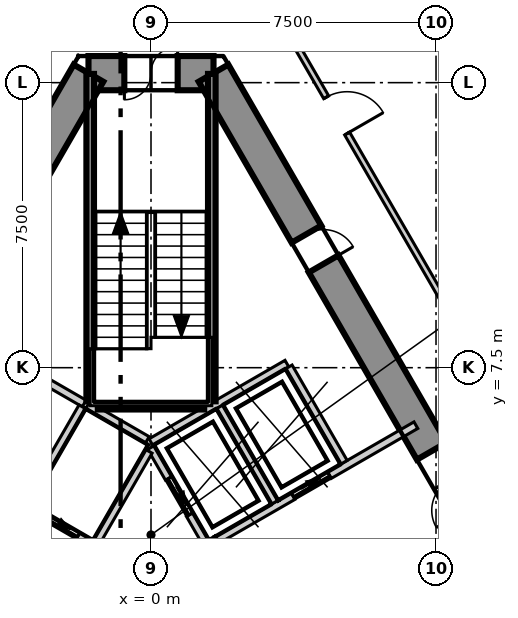
"""IFC4 building model, lengths in metres.
Left out: names, types, materials, properties, quantities, classifications, styles, units other than length and angle.
Written with IfcOpenShell. Run it as: python <this file> out.ifc"""

import sys

from ifc_helpers import new_model, si_unit, direction, frame, frame_2d, origin, place, context, subcontext, project, spatial, polyline, rectangle, outline, extrude, element, fill, save


model = new_model("IFC4")
c1 = context("Model", 3, precision=1e-05, world=origin(), true_north=direction((0.0, 1.0)))
c2 = subcontext(c1, "Body", "Model", "MODEL_VIEW")
j1 = project(units=[si_unit("LENGTHUNIT", "METRE"), si_unit("PLANEANGLEUNIT", "RADIAN")], contexts=[c1])
p1 = place(None, origin())
s1 = spatial("IfcSite", under=j1, at=p1, CompositionType="ELEMENT")
p2 = place(p1, origin())
s2 = spatial("IfcBuilding", under=s1, at=p2, CompositionType="ELEMENT")
p3 = place(p2, frame((0.0, 0.0, 47.3)))
s3 = spatial("IfcBuildingStorey", under=s2, at=p3, CompositionType="ELEMENT", Elevation=47.3)
p4 = place(p3, frame((1.645, 15.25, -0.3), z_axis=(0.0, 0.0, 1.0), x_axis=(-1.0, 0.0, 0.0)))
e1 = element("IfcWall", 1, at=p4, inside=s3, PredefinedType="SHEAR", context=c2, shape_type="SweptSolid", body=[
    extrude(outline(polyline([(-0.26, -0.45), (1.645, -0.45), (3.55, -0.45), (3.031, 0.45), (1.645, 0.45), (0.259, 0.45), (-0.26, -0.45)])), origin(), (0.0, 0.0, 1.0), 4.0),
])
p5 = place(p4, frame((0.945, 0.0, 0.3)))
e2 = element("IfcOpeningElement", 2, at=p5, cuts=e1, PredefinedType="OPENING", context=c2, shape_type="SweptSolid", body=[
    extrude(rectangle(XDim=1.4, YDim=2.1, at=frame_2d((0.7, 1.05))), frame((0.0, 0.46, 0.0), z_axis=(0.0, -1.0, 0.0), x_axis=(1.0, 0.0, 0.0)), (0.0, 0.0, 1.0), 0.92),
])
p6 = place(p3, frame((-1.645, 15.25, -0.3), z_axis=(0.0, 0.0, 1.0), x_axis=(-0.500026485275, -0.866010111964, 0.0)))
e3 = element("IfcWall", 3, at=p6, inside=s3, PredefinedType="SHEAR", context=c2, shape_type="SweptSolid", body=[
    extrude(outline(polyline([(-0.26, -0.45), (1.685, -0.45), (3.63, -0.45), (5.576, -0.45), (7.521, -0.45), (9.466, -0.449), (11.411, -0.449), (13.357, -0.449), (15.302, -0.449), (17.247, -0.449), (19.192, -0.449), (21.138, -0.449), (23.083, -0.449), (25.028, -0.449), (24.509, 0.45), (22.644, 0.45), (20.778, 0.45), (18.913, 0.45), (17.048, 0.45), (15.182, 0.449), (13.317, 0.449), (11.452, 0.449), (9.587, 0.449), (7.721, 0.449), (5.856, 0.449), (3.991, 0.449), (2.125, 0.449), (0.26, 0.449), (-0.26, -0.45)])), origin(), (0.0, 0.0, 1.0), 4.0),
])
p7 = place(p6, frame((11.834, 0.0, 0.3)))
e4 = element("IfcOpeningElement", 4, at=p7, cuts=e3, PredefinedType="OPENING", context=c2, shape_type="SweptSolid", body=[
    extrude(rectangle(XDim=1.1, YDim=2.1, at=frame_2d((0.55, 1.05))), frame((0.0, 0.46, 0.0), z_axis=(0.0, -1.0, 0.0), x_axis=(1.0, 0.0, 0.0)), (0.0, 0.0, 1.0), 0.92),
])
p8 = place(p6, frame((6.671, 0.0, 0.3)))
e5 = element("IfcOpeningElement", 5, at=p8, cuts=e3, PredefinedType="OPENING", context=c2, shape_type="SweptSolid", body=[
    extrude(rectangle(XDim=1.0, YDim=2.1, at=frame_2d((0.5, 1.05))), frame((0.0, 0.46, 0.0), z_axis=(0.0, -1.0, 0.0), x_axis=(1.0, 0.0, 0.0)), (0.0, 0.0, 1.0), 0.92),
])
p9 = place(p3, frame((14.03, -6.2, -0.3), z_axis=(0.0, 0.0, 1.0), x_axis=(-0.500026485275, 0.866010111964, 0.0)))
e6 = element("IfcWall", 6, at=p9, inside=s3, PredefinedType="SHEAR", context=c2, shape_type="SweptSolid", body=[
    extrude(outline(polyline([(-0.26, -0.449), (1.685, -0.449), (3.63, -0.449), (5.576, -0.449), (7.521, -0.449), (9.466, -0.449), (11.411, -0.449), (13.357, -0.449), (15.302, -0.449), (17.247, -0.45), (19.192, -0.45), (21.138, -0.45), (23.083, -0.45), (25.028, -0.45), (24.509, 0.449), (22.644, 0.449), (20.778, 0.449), (18.913, 0.449), (17.048, 0.449), (15.182, 0.449), (13.317, 0.449), (11.452, 0.449), (9.587, 0.449), (7.721, 0.45), (5.856, 0.45), (3.991, 0.45), (2.125, 0.45), (0.26, 0.45), (-0.26, -0.449)])), origin(), (0.0, 0.0, 1.0), 4.0),
])
p10 = place(p9, frame((11.484, 0.0, 0.3)))
e7 = element("IfcOpeningElement", 7, at=p10, cuts=e6, PredefinedType="OPENING", context=c2, shape_type="SweptSolid", body=[
    extrude(rectangle(XDim=1.8, YDim=2.1, at=frame_2d((0.9, 1.05))), frame((0.0, 0.46, 0.0), z_axis=(0.0, -1.0, 0.0), x_axis=(1.0, 0.0, 0.0)), (0.0, 0.0, 1.0), 0.92),
])
p11 = place(p9, frame((18.976, 0.0, 0.3)))
e8 = element("IfcOpeningElement", 8, at=p11, cuts=e6, PredefinedType="OPENING", context=c2, shape_type="SweptSolid", body=[
    extrude(rectangle(XDim=0.9, YDim=2.1, at=frame_2d((0.45, 1.05))), frame((0.0, 0.46, 0.0), z_axis=(0.0, -1.0, 0.0), x_axis=(1.0, 0.0, 0.0)), (0.0, 0.0, 1.0), 0.92),
])
p12 = place(p3, frame((34.701, -16.089, 0.0), z_axis=(0.0, 0.0, 1.0), x_axis=(-0.499998722828, 0.866026141159, 0.0)))
e9 = element("IfcWall", 9, at=p12, inside=s3, PredefinedType="ELEMENTEDWALL", context=c2, shape_type="SweptSolid", body=[
    extrude(rectangle(XDim=62.548, YDim=0.2, at=frame_2d((31.274, 0.0))), origin(), (0.0, 0.0, 1.0), 3.7),
])
p13 = place(p12, frame((2.25, 0.0, 0.9)))
e10 = element("IfcOpeningElement", 10, at=p13, cuts=e9, PredefinedType="OPENING", context=c2, shape_type="SweptSolid", body=[
    extrude(rectangle(XDim=5.6, YDim=2.5, at=frame_2d((2.8, 1.25))), frame((0.0, 0.11, 0.0), z_axis=(0.0, -1.0, 0.0), x_axis=(1.0, 0.0, 0.0)), (0.0, 0.0, 1.0), 0.22),
])
p14 = place(p12, frame((9.746, 0.0, 0.9)))
e11 = element("IfcOpeningElement", 11, at=p14, cuts=e9, PredefinedType="OPENING", context=c2, shape_type="SweptSolid", body=[
    extrude(rectangle(XDim=5.6, YDim=2.5, at=frame_2d((2.8, 1.25))), frame((0.0, 0.11, 0.0), z_axis=(0.0, -1.0, 0.0), x_axis=(1.0, 0.0, 0.0)), (0.0, 0.0, 1.0), 0.22),
])
p15 = place(p12, frame((17.241, 0.0, 0.9)))
e12 = element("IfcOpeningElement", 12, at=p15, cuts=e9, PredefinedType="OPENING", context=c2, shape_type="SweptSolid", body=[
    extrude(rectangle(XDim=5.6, YDim=2.5, at=frame_2d((2.8, 1.25))), frame((0.0, 0.11, 0.0), z_axis=(0.0, -1.0, 0.0), x_axis=(1.0, 0.0, 0.0)), (0.0, 0.0, 1.0), 0.22),
])
p16 = place(p12, frame((24.736, 0.0, 0.9)))
e13 = element("IfcOpeningElement", 13, at=p16, cuts=e9, PredefinedType="OPENING", context=c2, shape_type="SweptSolid", body=[
    extrude(rectangle(XDim=5.6, YDim=2.5, at=frame_2d((2.8, 1.25))), frame((0.0, 0.11, 0.0), z_axis=(0.0, -1.0, 0.0), x_axis=(1.0, 0.0, 0.0)), (0.0, 0.0, 1.0), 0.22),
])
p17 = place(p12, frame((32.232, 0.0, 0.9)))
e14 = element("IfcOpeningElement", 14, at=p17, cuts=e9, PredefinedType="OPENING", context=c2, shape_type="SweptSolid", body=[
    extrude(rectangle(XDim=5.6, YDim=2.5, at=frame_2d((2.8, 1.25))), frame((0.0, 0.11, 0.0), z_axis=(0.0, -1.0, 0.0), x_axis=(1.0, 0.0, 0.0)), (0.0, 0.0, 1.0), 0.22),
])
p18 = place(p12, frame((39.727, 0.0, 0.9)))
e15 = element("IfcOpeningElement", 15, at=p18, cuts=e9, PredefinedType="OPENING", context=c2, shape_type="SweptSolid", body=[
    extrude(rectangle(XDim=5.6, YDim=2.5, at=frame_2d((2.8, 1.25))), frame((0.0, 0.11, 0.0), z_axis=(0.0, -1.0, 0.0), x_axis=(1.0, 0.0, 0.0)), (0.0, 0.0, 1.0), 0.22),
])
p19 = place(p12, frame((47.222, 0.0, 0.9)))
e16 = element("IfcOpeningElement", 16, at=p19, cuts=e9, PredefinedType="OPENING", context=c2, shape_type="SweptSolid", body=[
    extrude(rectangle(XDim=5.6, YDim=2.5, at=frame_2d((2.8, 1.25))), frame((0.0, 0.11, 0.0), z_axis=(0.0, -1.0, 0.0), x_axis=(1.0, 0.0, 0.0)), (0.0, 0.0, 1.0), 0.22),
])
p20 = place(p12, frame((54.717, 0.0, 0.9)))
e17 = element("IfcOpeningElement", 17, at=p20, cuts=e9, PredefinedType="OPENING", context=c2, shape_type="SweptSolid", body=[
    extrude(rectangle(XDim=5.6, YDim=2.5, at=frame_2d((2.8, 1.25))), frame((0.0, 0.11, 0.0), z_axis=(0.0, -1.0, 0.0), x_axis=(1.0, 0.0, 0.0)), (0.0, 0.0, 1.0), 0.22),
])
p21 = place(p3, frame((-19.497, -11.17, 0.0), z_axis=(0.0, 0.0, 1.0), x_axis=(0.499998854553, 0.866026065108, 0.0)))
e18 = element("IfcWall", 18, at=p21, inside=s3, PredefinedType="PARTITIONING", context=c2, shape_type="SweptSolid", body=[
    extrude(rectangle(XDim=38.994, YDim=0.15, at=frame_2d((19.497, 0.0))), origin(), (0.0, 0.0, 1.0), 3.7),
])
p22 = place(p21, frame((36.144, 0.0, 0.0)))
e19 = element("IfcOpeningElement", 19, at=p22, cuts=e18, PredefinedType="OPENING", context=c2, shape_type="SweptSolid", body=[
    extrude(rectangle(XDim=1.1, YDim=2.1, at=frame_2d((0.55, 1.05))), frame((0.0, 0.085, 0.0), z_axis=(0.0, -1.0, 0.0), x_axis=(1.0, 0.0, 0.0)), (0.0, 0.0, 1.0), 0.17),
])
p23 = place(p21, frame((21.963, 0.0, 0.0)))
e20 = element("IfcOpeningElement", 20, at=p23, cuts=e18, PredefinedType="OPENING", context=c2, shape_type="SweptSolid", body=[
    extrude(rectangle(XDim=1.1, YDim=2.1, at=frame_2d((0.55, 1.05))), frame((0.0, 0.085, 0.0), z_axis=(0.0, -1.0, 0.0), x_axis=(1.0, 0.0, 0.0)), (0.0, 0.0, 1.0), 0.17),
])
p24 = place(p21, frame((32.363, 0.0, 0.0)))
e21 = element("IfcOpeningElement", 21, at=p24, cuts=e18, PredefinedType="OPENING", context=c2, shape_type="SweptSolid", body=[
    extrude(rectangle(XDim=0.9, YDim=2.1, at=frame_2d((0.45, 1.05))), frame((0.0, 0.085, 0.0), z_axis=(0.0, -1.0, 0.0), x_axis=(1.0, 0.0, 0.0)), (0.0, 0.0, 1.0), 0.17),
])
p25 = place(p21, frame((29.163, 0.0, 0.0)))
e22 = element("IfcOpeningElement", 22, at=p25, cuts=e18, PredefinedType="OPENING", context=c2, shape_type="SweptSolid", body=[
    extrude(rectangle(XDim=0.9, YDim=2.1, at=frame_2d((0.45, 1.05))), frame((0.0, 0.085, 0.0), z_axis=(0.0, -1.0, 0.0), x_axis=(1.0, 0.0, 0.0)), (0.0, 0.0, 1.0), 0.17),
])
p26 = place(p21, frame((26.263, 0.0, 0.0)))
e23 = element("IfcOpeningElement", 23, at=p26, cuts=e18, PredefinedType="OPENING", context=c2, shape_type="SweptSolid", body=[
    extrude(rectangle(XDim=1.0, YDim=2.1, at=frame_2d((0.5, 1.05))), frame((0.0, 0.085, 0.0), z_axis=(0.0, -1.0, 0.0), x_axis=(1.0, 0.0, 0.0)), (0.0, 0.0, 1.0), 0.17),
])
p27 = place(p21, frame((11.373, 0.0, 0.0)))
e24 = element("IfcOpeningElement", 24, at=p27, cuts=e18, PredefinedType="OPENING", context=c2, shape_type="SweptSolid", body=[
    extrude(rectangle(XDim=1.1, YDim=2.1, at=frame_2d((0.55, 1.05))), frame((0.0, 0.085, 0.0), z_axis=(0.0, -1.0, 0.0), x_axis=(1.0, 0.0, 0.0)), (0.0, 0.0, 1.0), 0.17),
])
p28 = place(p21, frame((1.581, 0.0, 0.0)))
e25 = element("IfcOpeningElement", 25, at=p28, cuts=e18, PredefinedType="OPENING", context=c2, shape_type="SweptSolid", body=[
    extrude(rectangle(XDim=1.1, YDim=2.1, at=frame_2d((0.55, 1.05))), frame((0.0, 0.085, 0.0), z_axis=(0.0, -1.0, 0.0), x_axis=(1.0, 0.0, 0.0)), (0.0, 0.0, 1.0), 0.17),
])
p29 = place(p3, frame((0.075, 22.47, 0.0), z_axis=(0.0, 0.0, 1.0), x_axis=(0.500002280369, -0.866024087209, 0.0)))
e26 = element("IfcWall", 26, at=p29, inside=s3, PredefinedType="PARTITIONING", context=c2, shape_type="SweptSolid", body=[
    extrude(rectangle(XDim=38.844, YDim=0.15, at=frame_2d((19.422, 0.0))), origin(), (0.0, 0.0, 1.0), 3.7),
])
p30 = place(p29, frame((36.244, 0.0, 0.0)))
e27 = element("IfcOpeningElement", 27, at=p30, cuts=e26, PredefinedType="OPENING", context=c2, shape_type="SweptSolid", body=[
    extrude(rectangle(XDim=1.0, YDim=2.1, at=frame_2d((0.5, 1.05))), frame((0.0, 0.085, 0.0), z_axis=(0.0, -1.0, 0.0), x_axis=(1.0, 0.0, 0.0)), (0.0, 0.0, 1.0), 0.17),
])
p31 = place(p29, frame((21.963, 0.0, 0.0)))
e28 = element("IfcOpeningElement", 28, at=p31, cuts=e26, PredefinedType="OPENING", context=c2, shape_type="SweptSolid", body=[
    extrude(rectangle(XDim=1.1, YDim=2.1, at=frame_2d((0.55, 1.05))), frame((0.0, 0.085, 0.0), z_axis=(0.0, -1.0, 0.0), x_axis=(1.0, 0.0, 0.0)), (0.0, 0.0, 1.0), 0.17),
])
p32 = place(p29, frame((32.363, 0.0, 0.0)))
e29 = element("IfcOpeningElement", 29, at=p32, cuts=e26, PredefinedType="OPENING", context=c2, shape_type="SweptSolid", body=[
    extrude(rectangle(XDim=0.9, YDim=2.1, at=frame_2d((0.45, 1.05))), frame((0.0, 0.085, 0.0), z_axis=(0.0, -1.0, 0.0), x_axis=(1.0, 0.0, 0.0)), (0.0, 0.0, 1.0), 0.17),
])
p33 = place(p29, frame((29.163, 0.0, 0.0)))
e30 = element("IfcOpeningElement", 30, at=p33, cuts=e26, PredefinedType="OPENING", context=c2, shape_type="SweptSolid", body=[
    extrude(rectangle(XDim=0.9, YDim=2.1, at=frame_2d((0.45, 1.05))), frame((0.0, 0.085, 0.0), z_axis=(0.0, -1.0, 0.0), x_axis=(1.0, 0.0, 0.0)), (0.0, 0.0, 1.0), 0.17),
])
p34 = place(p29, frame((26.263, 0.0, 0.0)))
e31 = element("IfcOpeningElement", 31, at=p34, cuts=e26, PredefinedType="OPENING", context=c2, shape_type="SweptSolid", body=[
    extrude(rectangle(XDim=1.0, YDim=2.1, at=frame_2d((0.5, 1.05))), frame((0.0, 0.085, 0.0), z_axis=(0.0, -1.0, 0.0), x_axis=(1.0, 0.0, 0.0)), (0.0, 0.0, 1.0), 0.17),
])
p35 = place(p29, frame((9.071, 0.0, 0.0)))
e32 = element("IfcOpeningElement", 32, at=p35, cuts=e26, PredefinedType="OPENING", context=c2, shape_type="SweptSolid", body=[
    extrude(rectangle(XDim=1.1, YDim=2.1, at=frame_2d((0.55, 1.05))), frame((0.0, 0.085, 0.0), z_axis=(0.0, -1.0, 0.0), x_axis=(1.0, 0.0, 0.0)), (0.0, 0.0, 1.0), 0.17),
])
p36 = place(p3, frame((-0.002, 5.541, 0.0), z_axis=(0.0, 0.0, 1.0), x_axis=(0.86600155993, 0.500041296494, 0.0)))
e33 = element("IfcWall", 33, at=p36, inside=s3, PredefinedType="SOLIDWALL", context=c2, shape_type="SweptSolid", body=[
    extrude(rectangle(XDim=4.132, YDim=0.2, at=frame_2d((2.066, 0.0))), origin(), (0.0, 0.0, 1.0), 3.7),
])
p37 = place(p3, frame((0.0, 5.4, 0.0), z_axis=(0.0, 0.0, 1.0), x_axis=(0.500103862429, -0.865965430478, 0.0)))
e34 = element("IfcWall", 34, at=p37, inside=s3, PredefinedType="SOLIDWALL", context=c2, shape_type="SweptSolid", body=[
    extrude(rectangle(XDim=2.973, YDim=0.2, at=frame_2d((1.487, 0.0))), origin(), (0.0, 0.0, 1.0), 3.7),
])
p38 = place(p37, frame((0.937, 0.0, 0.0)))
e35 = element("IfcOpeningElement", 35, at=p38, cuts=e34, PredefinedType="OPENING", context=c2, shape_type="SweptSolid", body=[
    extrude(rectangle(XDim=1.1, YDim=2.1, at=frame_2d((0.55, 1.05))), frame((0.0, 0.11, 0.0), z_axis=(0.0, -1.0, 0.0), x_axis=(1.0, 0.0, 0.0)), (0.0, 0.0, 1.0), 0.22),
])
p39 = place(p3, frame((1.578, 2.874, 0.0), z_axis=(0.0, 0.0, 1.0), x_axis=(0.866031483044, 0.499989470266, 0.0)))
e36 = element("IfcWall", 36, at=p39, inside=s3, PredefinedType="SOLIDWALL", context=c2, shape_type="SweptSolid", body=[
    extrude(rectangle(XDim=6.226, YDim=0.2, at=frame_2d((3.113, 0.0))), origin(), (0.0, 0.0, 1.0), 3.7),
])
p40 = place(p39, frame((2.496, 0.0, 0.0)))
e37 = element("IfcOpeningElement", 37, at=p40, cuts=e36, PredefinedType="OPENING", context=c2, shape_type="SweptSolid", body=[
    extrude(rectangle(XDim=1.1, YDim=2.1, at=frame_2d((0.55, 1.05))), frame((0.0, 0.11, 0.0), z_axis=(0.0, -1.0, 0.0), x_axis=(1.0, 0.0, 0.0)), (0.0, 0.0, 1.0), 0.22),
])
p41 = place(p3, frame((3.278, -0.071, 0.0), z_axis=(0.0, 0.0, 1.0), x_axis=(0.865953757655, 0.500124074208, 0.0)))
e38 = element("IfcWall", 38, at=p41, inside=s3, PredefinedType="SOLIDWALL", context=c2, shape_type="SweptSolid", body=[
    extrude(rectangle(XDim=6.227, YDim=0.2, at=frame_2d((3.113, 0.0))), origin(), (0.0, 0.0, 1.0), 3.7),
])
for number, where, z_axis, x_axis in (
    (39, (3.626, 7.52, 0.0), (0.0, 0.0, 1.0), (0.5, -0.866, 0.0)),
    (40, (1.807, 6.47, 0.0), (0.0, 0.0, 1.0), (0.5, -0.866, 0.0)),
):
    element("IfcWall", number, at=place(p3, frame(where, z_axis=z_axis, x_axis=x_axis)), inside=s3, PredefinedType="SOLIDWALL", context=c2, shape_type="SweptSolid", body=[
        extrude(rectangle(XDim=2.9, YDim=0.2, at=frame_2d((1.45, 0.0))), origin(), (0.0, 0.0, 1.0), 3.7),
    ])
p42 = place(p3, frame((-3.489, 7.557, 0.0), z_axis=(0.0, 0.0, 1.0), x_axis=(0.866010750942, -0.50002537861, 0.0)))
e41 = element("IfcWall", 41, at=p42, inside=s3, PredefinedType="SOLIDWALL", context=c2, shape_type="SweptSolid", body=[
    extrude(rectangle(XDim=2.0, YDim=0.2, at=frame_2d((1.0, 0.0))), origin(), (0.0, 0.0, 1.0), 3.7),
])
p43 = place(p3, frame((-3.309, 3.873, 0.0), z_axis=(0.0, 0.0, 1.0), x_axis=(0.866098583652, -0.499873227325, 0.0)))
e42 = element("IfcWall", 42, at=p43, inside=s3, PredefinedType="SOLIDWALL", context=c2, shape_type="SweptSolid", body=[
    extrude(rectangle(XDim=2.103, YDim=0.2, at=frame_2d((1.051, 0.0))), origin(), (0.0, 0.0, 1.0), 3.7),
])
p44 = place(p43, frame((0.502, 0.0, 0.0)))
e43 = element("IfcOpeningElement", 43, at=p44, cuts=e42, PredefinedType="OPENING", context=c2, shape_type="SweptSolid", body=[
    extrude(rectangle(XDim=1.1, YDim=2.1, at=frame_2d((0.55, 1.05))), frame((0.0, 0.11, 0.0), z_axis=(0.0, -1.0, 0.0), x_axis=(1.0, 0.0, 0.0)), (0.0, 0.0, 1.0), 0.22),
])
p45 = place(p3, frame((-3.257, 3.959, 0.0), z_axis=(0.0, 0.0, 1.0), x_axis=(0.50012328804, 0.865954211699, 0.0)))
e44 = element("IfcWall", 44, at=p45, inside=s3, PredefinedType="SOLIDWALL", context=c2, shape_type="SweptSolid", body=[
    extrude(rectangle(XDim=2.9, YDim=0.2, at=frame_2d((1.45, 0.0))), origin(), (0.0, 0.0, 1.0), 3.7),
])
p46 = place(p3, frame((-1.67, 6.507, 0.0), z_axis=(0.0, 0.0, 1.0), x_axis=(0.865941441609, -0.500145398563, 0.0)))
e45 = element("IfcWall", 45, at=p46, inside=s3, PredefinedType="SOLIDWALL", context=c2, shape_type="SweptSolid", body=[
    extrude(rectangle(XDim=1.815, YDim=0.2, at=frame_2d((0.908, 0.0))), origin(), (0.0, 0.0, 1.0), 3.7),
])
p47 = place(p3, frame((-1.438, 2.909, 0.0), z_axis=(0.0, 0.0, 1.0), x_axis=(0.499829630636, 0.866123744241, 0.0)))
e46 = element("IfcWall", 46, at=p47, inside=s3, PredefinedType="SOLIDWALL", context=c2, shape_type="SweptSolid", body=[
    extrude(rectangle(XDim=2.761, YDim=0.2, at=frame_2d((1.38, 0.0))), origin(), (0.0, 0.0, 1.0), 3.7),
])
p48 = place(p3, frame((1.6, 6.615, 0.0), z_axis=(0.0, 0.0, 1.0), x_axis=(0.0, 1.0, 0.0)))
e47 = element("IfcWall", 47, at=p48, inside=s3, PredefinedType="SOLIDWALL", context=c2, shape_type="SweptSolid", body=[
    extrude(rectangle(XDim=8.615, YDim=0.2, at=frame_2d((4.308, 0.0))), origin(), (0.0, 0.0, 1.0), 3.7),
])
p49 = place(p3, frame((-1.4, 6.5, 0.0), z_axis=(0.0, 0.0, 1.0), x_axis=(1.0, 0.0, 0.0)))
e48 = element("IfcWall", 48, at=p49, inside=s3, PredefinedType="SOLIDWALL", context=c2, shape_type="SweptSolid", body=[
    extrude(rectangle(XDim=2.8, YDim=0.2, at=frame_2d((1.4, 0.0))), origin(), (0.0, 0.0, 1.0), 3.7),
])
p50 = place(p3, frame((-1.6, 6.615, 0.0), z_axis=(0.0, 0.0, 1.0), x_axis=(0.0, 1.0, 0.0)))
e49 = element("IfcWall", 49, at=p50, inside=s3, PredefinedType="SOLIDWALL", context=c2, shape_type="SweptSolid", body=[
    extrude(rectangle(XDim=8.615, YDim=0.2, at=frame_2d((4.308, 0.0))), origin(), (0.0, 0.0, 1.0), 3.7),
])
p51 = place(p38, origin())
e50 = element("IfcDoor", 50, at=p51, inside=s3, OperationType="SLIDING_TO_LEFT", PredefinedType="DOOR", context=c2, shape_type="SweptSolid", body=[
    extrude(rectangle(XDim=1.1, YDim=2.1, at=frame_2d((0.55, 1.05))), frame((0.0, 0.025, 0.0), z_axis=(0.0, -1.0, 0.0), x_axis=(1.0, 0.0, 0.0)), (0.0, 0.0, 1.0), 0.05),
])
fill(e35, e50)
p52 = place(p40, origin())
e51 = element("IfcDoor", 51, at=p52, inside=s3, OperationType="SLIDING_TO_LEFT", PredefinedType="DOOR", context=c2, shape_type="SweptSolid", body=[
    extrude(rectangle(XDim=1.1, YDim=2.1, at=frame_2d((0.55, 1.05))), frame((0.0, 0.025, 0.0), z_axis=(0.0, -1.0, 0.0), x_axis=(1.0, 0.0, 0.0)), (0.0, 0.0, 1.0), 0.05),
])
fill(e37, e51)
p53 = place(p44, origin())
e52 = element("IfcDoor", 52, at=p53, inside=s3, OperationType="SLIDING_TO_LEFT", PredefinedType="DOOR", context=c2, shape_type="SweptSolid", body=[
    extrude(rectangle(XDim=1.1, YDim=2.1, at=frame_2d((0.55, 1.05))), frame((0.0, 0.025, 0.0), z_axis=(0.0, -1.0, 0.0), x_axis=(1.0, 0.0, 0.0)), (0.0, 0.0, 1.0), 0.05),
])
fill(e43, e52)
p54 = place(p35, origin())
e53 = element("IfcDoor", 53, at=p54, inside=s3, OperationType="SINGLE_SWING_LEFT", PredefinedType="DOOR", context=c2, shape_type="SweptSolid", body=[
    extrude(rectangle(XDim=1.1, YDim=2.1, at=frame_2d((0.55, 1.05))), frame((0.0, 0.025, 0.0), z_axis=(0.0, -1.0, 0.0), x_axis=(1.0, 0.0, 0.0)), (0.0, 0.0, 1.0), 0.05),
])
fill(e32, e53)
p55 = place(p10, origin())
e54 = element("IfcDoor", 54, at=p55, inside=s3, OperationType="DOUBLE_DOOR_SINGLE_SWING", PredefinedType="DOOR", context=c2, shape_type="SweptSolid", body=[
    extrude(rectangle(XDim=1.8, YDim=2.1, at=frame_2d((0.9, 1.05))), frame((0.0, 0.025, 0.0), z_axis=(0.0, -1.0, 0.0), x_axis=(1.0, 0.0, 0.0)), (0.0, 0.0, 1.0), 0.05),
])
fill(e7, e54)
p56 = place(p5, origin())
e55 = element("IfcDoor", 55, at=p56, inside=s3, OperationType="DOUBLE_DOOR_SINGLE_SWING", PredefinedType="DOOR", context=c2, shape_type="SweptSolid", body=[
    extrude(rectangle(XDim=1.4, YDim=2.1, at=frame_2d((0.7, 1.05))), frame((0.0, 0.025, 0.0), z_axis=(0.0, -1.0, 0.0), x_axis=(1.0, 0.0, 0.0)), (0.0, 0.0, 1.0), 0.05),
])
fill(e2, e55)
p57 = place(p11, origin())
e56 = element("IfcDoor", 56, at=p57, inside=s3, OperationType="SINGLE_SWING_LEFT", PredefinedType="DOOR", context=c2, shape_type="SweptSolid", body=[
    extrude(rectangle(XDim=0.9, YDim=2.1, at=frame_2d((0.45, 1.05))), frame((0.0, 0.025, 0.0), z_axis=(0.0, -1.0, 0.0), x_axis=(1.0, 0.0, 0.0)), (0.0, 0.0, 1.0), 0.05),
])
fill(e8, e56)
save(model, sys.argv[1])
